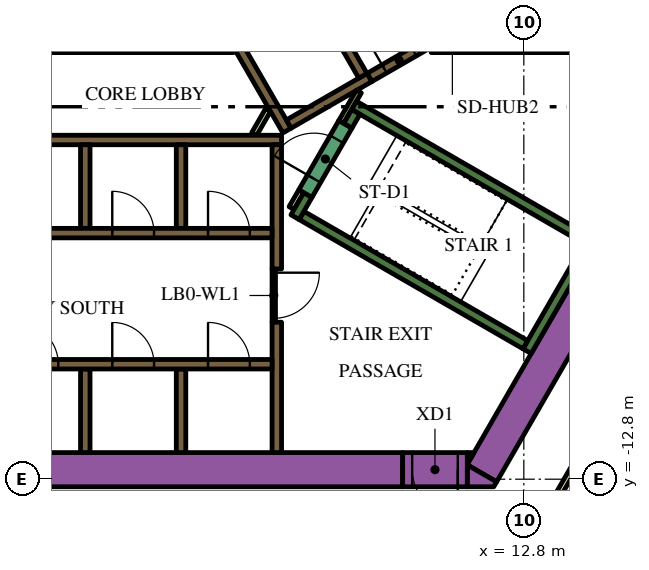
"""IFC4 building model, lengths in metres.
Left out: names, types, materials, properties, quantities, classifications, styles, units other than length and angle.
Written with IfcOpenShell. Run it as: python <this file> out.ifc"""

import sys

from ifc_helpers import new_model, si_unit, direction, frame, frame_2d, origin, place, context, subcontext, project, spatial, polyline, rectangle, outline, extrude, element, fill, save


model = new_model("IFC4")
c1 = context("Model", 3, precision=1e-05, world=origin(), true_north=direction((0.0, 1.0)))
c2 = subcontext(c1, "Body", "Model", "MODEL_VIEW")
j1 = project(units=[si_unit("LENGTHUNIT", "METRE"), si_unit("PLANEANGLEUNIT", "RADIAN")], contexts=[c1])
p1 = place(None, origin())
s1 = spatial("IfcSite", under=j1, at=p1, CompositionType="ELEMENT")
p2 = place(p1, origin())
s2 = spatial("IfcBuilding", under=s1, at=p2, CompositionType="ELEMENT")
p3 = place(p2, frame((0.0, 0.0, 91.5)))
s3 = spatial("IfcBuildingStorey", under=s2, at=p3, CompositionType="ELEMENT", Elevation=91.5)
p4 = place(p3, frame((6.776, 13.364, 0.0), z_axis=(0.0, 0.0, 1.0), x_axis=(0.500004177138, -0.8660229921, 0.0)))
e1 = element("IfcWall", 1, at=p4, inside=s3, PredefinedType="SOLIDWALL", context=c2, shape_type="SweptSolid", body=[
    extrude(rectangle(XDim=20.204, YDim=0.9, at=frame_2d((10.102, 0.0))), origin(), (0.0, 0.0, 1.0), 3.9),
])
p5 = place(p3, frame((11.695, -12.644, 0.0), z_axis=(0.0, 0.0, 1.0), x_axis=(0.500010229568, 0.86601949766, 0.0)))
e2 = element("IfcWall", 2, at=p5, inside=s3, PredefinedType="SOLIDWALL", context=c2, shape_type="SweptSolid", body=[
    extrude(rectangle(XDim=9.326, YDim=0.9, at=frame_2d((4.663, 0.0))), origin(), (0.0, 0.0, 1.0), 3.9),
])
p6 = place(p3, origin())
e3 = element("IfcWall", 3, at=p6, inside=s3, PredefinedType="SOLIDWALL", context=c2, shape_type="SweptSolid", body=[
    extrude(outline(polyline([(12.009, -13.0), (11.312, -13.0), (11.312, -12.425), (12.083, -12.871), (12.009, -13.0)])), origin(), (0.0, 0.0, 1.0), 3.9),
])
e4 = element("IfcWall", 4, at=p6, inside=s3, PredefinedType="SOLIDWALL", context=c2, shape_type="SweptSolid", body=[
    extrude(outline(polyline([(11.489, -12.1), (11.312, -12.407), (11.312, -12.1), (11.489, -12.1)])), origin(), (0.0, 0.0, 1.0), 3.9),
])
p7 = place(p3, frame((-12.019, -12.55, 0.0), z_axis=(0.0, 0.0, 1.0), x_axis=(1.0, 0.0, 0.0)))
e5 = element("IfcWall", 5, at=p7, inside=s3, PredefinedType="SOLIDWALL", context=c2, shape_type="SweptSolid", body=[
    extrude(rectangle(XDim=21.63, YDim=0.9, at=frame_2d((10.815, 0.0))), origin(), (0.0, 0.0, 1.0), 3.9),
])
p8 = place(p3, frame((12.885, -9.431, 0.0), z_axis=(0.0, 0.0, 1.0), x_axis=(0.500020560727, 0.866013532718, 0.0)))
e6 = element("IfcWall", 6, at=p8, inside=s3, PredefinedType="SOLIDWALL", context=c2, shape_type="SweptSolid", body=[
    extrude(rectangle(XDim=3.45, YDim=0.25, at=frame_2d((1.725, 0.0))), origin(), (0.0, 0.0, 1.0), 3.9),
])
p9 = place(p3, frame((12.84, -9.261, 0.0), z_axis=(0.0, 0.0, 1.0), x_axis=(-0.866013990052, 0.500019768644, 0.0)))
e7 = element("IfcWall", 7, at=p9, inside=s3, PredefinedType="SOLIDWALL", context=c2, shape_type="SweptSolid", body=[
    extrude(rectangle(XDim=6.8, YDim=0.25, at=frame_2d((3.4, 0.0))), origin(), (0.0, 0.0, 1.0), 3.9),
])
p10 = place(p3, frame((6.78, -5.906, 0.0), z_axis=(0.0, 0.0, 1.0), x_axis=(0.500223362819, 0.865896406789, 0.0)))
e8 = element("IfcWall", 8, at=p10, inside=s3, PredefinedType="SOLIDWALL", context=c2, shape_type="SweptSolid", body=[
    extrude(rectangle(XDim=0.675, YDim=0.25, at=frame_2d((0.337, 0.0))), origin(), (0.0, 0.0, 1.0), 3.9),
])
p11 = place(p3, frame((8.334, -2.964, 0.0), z_axis=(0.0, 0.0, 1.0), x_axis=(0.866016039709, -0.500016218704, 0.0)))
e9 = element("IfcWall", 9, at=p11, inside=s3, PredefinedType="SOLIDWALL", context=c2, shape_type="SweptSolid", body=[
    extrude(rectangle(XDim=7.05, YDim=0.25, at=frame_2d((3.525, 0.0))), origin(), (0.0, 0.0, 1.0), 3.9),
])
p12 = place(p3, frame((8.168, -3.503, 0.0), z_axis=(0.0, 0.0, 1.0), x_axis=(0.49972245349, 0.866185586049, 0.0)))
e10 = element("IfcWall", 10, at=p12, inside=s3, PredefinedType="SOLIDWALL", context=c2, shape_type="SweptSolid", body=[
    extrude(rectangle(XDim=0.425, YDim=0.25, at=frame_2d((0.212, 0.0))), origin(), (0.0, 0.0, 1.0), 3.9),
])
p13 = place(p3, frame((-5.545, -3.875, 0.0), z_axis=(0.0, 0.0, 1.0), x_axis=(1.0, 0.0, 0.0)))
e11 = element("IfcWall", 11, at=p13, inside=s3, PredefinedType="SOLIDWALL", context=c2, shape_type="SweptSolid", body=[
    extrude(rectangle(XDim=11.97, YDim=0.25, at=frame_2d((5.985, 0.0))), origin(), (0.0, 0.0, 1.0), 3.9),
])
p14 = place(p3, frame((6.3, -8.67, 0.0), z_axis=(0.0, 0.0, 1.0), x_axis=(0.0, -1.0, 0.0)))
e12 = element("IfcWall", 12, at=p14, inside=s3, PredefinedType="SOLIDWALL", context=c2, shape_type="SweptSolid", body=[
    extrude(rectangle(XDim=3.43, YDim=0.25, at=frame_2d((1.715, 0.0))), origin(), (0.0, 0.0, 1.0), 3.9),
])
p15 = place(p3, frame((6.3, -7.268, 0.0), z_axis=(0.0, 0.0, 1.0), x_axis=(0.0, 1.0, 0.0)))
e13 = element("IfcWall", 13, at=p15, inside=s3, PredefinedType="SOLIDWALL", context=c2, shape_type="SweptSolid", body=[
    extrude(rectangle(XDim=3.268, YDim=0.25, at=frame_2d((1.634, 0.0))), origin(), (0.0, 0.0, 1.0), 3.9),
])
for number, where, z_axis, x_axis in (
    (14, (3.78, -4.0, 0.0), (0.0, 0.0, 1.0), (0.0, -1.0, 0.0)),
    (15, (1.26, -4.0, 0.0), (0.0, 0.0, 1.0), (0.0, -1.0, 0.0)),
    (16, (3.78, -12.1, 0.0), (0.0, 0.0, 1.0), (0.0, 1.0, 0.0)),
    (17, (1.26, -12.1, 0.0), (0.0, 0.0, 1.0), (0.0, 1.0, 0.0)),
):
    element("IfcWall", number, at=place(p3, frame(where, z_axis=z_axis, x_axis=x_axis)), inside=s3, PredefinedType="SOLIDWALL", context=c2, shape_type="SweptSolid", body=[
        extrude(rectangle(XDim=2.2, YDim=0.25, at=frame_2d((1.1, 0.0))), origin(), (0.0, 0.0, 1.0), 3.9),
    ])
e18 = element("IfcWall", 18, at=p6, inside=s3, PredefinedType="SOLIDWALL", context=c2, shape_type="SweptSolid", body=[
    extrude(outline(polyline([(0.566, 6.725), (0.566, 6.875), (0.566, 6.875), (0.565, 6.875), (0.361, 6.875), (0.035, 7.439), (0.252, 7.564), (0.377, 7.348), (6.552, -3.348), (6.677, -3.564), (6.46, -3.689), (0.448, 6.725), (0.565, 6.725), (0.566, 6.725), (0.566, 6.725)])), origin(), (0.0, 0.0, 1.0), 3.9),
])
p16 = place(p3, frame((6.614, -3.456, 0.0), z_axis=(0.0, 0.0, 1.0), x_axis=(0.866031582473, 0.499989298045, 0.0)))
e19 = element("IfcWall", 19, at=p16, inside=s3, PredefinedType="SOLIDWALL", context=c2, shape_type="SweptSolid", body=[
    extrude(rectangle(XDim=2.455, YDim=0.25, at=frame_2d((1.228, 0.0))), origin(), (0.0, 0.0, 1.0), 3.9),
])
p17 = place(p3, frame((6.945, -5.222, 0.0), z_axis=(0.0, 0.0, 1.0), x_axis=(-0.499818422106, -0.866130212453, 0.0)))
e20 = element("IfcWall", 20, at=p17, inside=s3, PredefinedType="PARTITIONING", context=c2, shape_type="SweptSolid", body=[
    extrude(rectangle(XDim=0.514, YDim=0.15, at=frame_2d((0.257, 0.0))), origin(), (0.0, 0.0, 1.0), 2.75),
])
p18 = place(p3, frame((5.705, -3.718, 0.0), z_axis=(0.0, 0.0, 1.0), x_axis=(0.499962090823, 0.866047289552, 0.0)))
e21 = element("IfcWall", 21, at=p18, inside=s3, PredefinedType="PARTITIONING", context=c2, shape_type="SweptSolid", body=[
    extrude(rectangle(XDim=0.735, YDim=0.15, at=frame_2d((0.367, 0.0))), origin(), (0.0, 0.0, 1.0), 2.75),
])
p19 = place(p3, frame((8.459, -2.599, 0.0), z_axis=(0.0, 0.0, 1.0), x_axis=(-0.500041054325, -0.866001699761, 0.0)))
e22 = element("IfcWall", 22, at=p19, inside=s3, PredefinedType="PARTITIONING", context=c2, shape_type="SweptSolid", body=[
    extrude(rectangle(XDim=0.929, YDim=0.15, at=frame_2d((0.464, 0.0))), origin(), (0.0, 0.0, 1.0), 3.9),
])
p20 = place(p3, frame((-6.175, -9.775, 0.0), z_axis=(0.0, 0.0, 1.0), x_axis=(1.0, 0.0, 0.0)))
e23 = element("IfcWall", 23, at=p20, inside=s3, PredefinedType="SOLIDWALL", context=c2, shape_type="SweptSolid", body=[
    extrude(rectangle(XDim=12.35, YDim=0.25, at=frame_2d((6.175, 0.0))), origin(), (0.0, 0.0, 1.0), 3.9),
])
p21 = place(p20, frame((0.585, 0.0, 0.0)))
e24 = element("IfcOpeningElement", 24, at=p21, cuts=e23, PredefinedType="OPENING", context=c2, shape_type="SweptSolid", body=[
    extrude(rectangle(XDim=1.1, YDim=2.1, at=frame_2d((0.55, 1.05))), frame((0.0, 0.135, 0.0), z_axis=(0.0, -1.0, 0.0), x_axis=(1.0, 0.0, 0.0)), (0.0, 0.0, 1.0), 0.27),
])
p22 = place(p20, frame((3.105, 0.0, 0.0)))
e25 = element("IfcOpeningElement", 25, at=p22, cuts=e23, PredefinedType="OPENING", context=c2, shape_type="SweptSolid", body=[
    extrude(rectangle(XDim=1.1, YDim=2.1, at=frame_2d((0.55, 1.05))), frame((0.0, 0.135, 0.0), z_axis=(0.0, -1.0, 0.0), x_axis=(1.0, 0.0, 0.0)), (0.0, 0.0, 1.0), 0.27),
])
p23 = place(p20, frame((5.625, 0.0, 0.0)))
e26 = element("IfcOpeningElement", 26, at=p23, cuts=e23, PredefinedType="OPENING", context=c2, shape_type="SweptSolid", body=[
    extrude(rectangle(XDim=1.1, YDim=2.1, at=frame_2d((0.55, 1.05))), frame((0.0, 0.135, 0.0), z_axis=(0.0, -1.0, 0.0), x_axis=(1.0, 0.0, 0.0)), (0.0, 0.0, 1.0), 0.27),
])
p24 = place(p20, frame((8.145, 0.0, 0.0)))
e27 = element("IfcOpeningElement", 27, at=p24, cuts=e23, PredefinedType="OPENING", context=c2, shape_type="SweptSolid", body=[
    extrude(rectangle(XDim=1.1, YDim=2.1, at=frame_2d((0.55, 1.05))), frame((0.0, 0.135, 0.0), z_axis=(0.0, -1.0, 0.0), x_axis=(1.0, 0.0, 0.0)), (0.0, 0.0, 1.0), 0.27),
])
p25 = place(p20, frame((10.665, 0.0, 0.0)))
e28 = element("IfcOpeningElement", 28, at=p25, cuts=e23, PredefinedType="OPENING", context=c2, shape_type="SweptSolid", body=[
    extrude(rectangle(XDim=1.1, YDim=2.1, at=frame_2d((0.55, 1.05))), frame((0.0, 0.135, 0.0), z_axis=(0.0, -1.0, 0.0), x_axis=(1.0, 0.0, 0.0)), (0.0, 0.0, 1.0), 0.27),
])
p26 = place(p3, frame((-6.175, -6.325, 0.0), z_axis=(0.0, 0.0, 1.0), x_axis=(1.0, 0.0, 0.0)))
e29 = element("IfcWall", 29, at=p26, inside=s3, PredefinedType="SOLIDWALL", context=c2, shape_type="SweptSolid", body=[
    extrude(rectangle(XDim=12.35, YDim=0.25, at=frame_2d((6.175, 0.0))), origin(), (0.0, 0.0, 1.0), 3.9),
])
p27 = place(p26, frame((3.205, 0.0, 0.0)))
e30 = element("IfcOpeningElement", 30, at=p27, cuts=e29, PredefinedType="OPENING", context=c2, shape_type="SweptSolid", body=[
    extrude(rectangle(XDim=0.9, YDim=2.1, at=frame_2d((0.45, 1.05))), frame((0.0, 0.135, 0.0), z_axis=(0.0, -1.0, 0.0), x_axis=(1.0, 0.0, 0.0)), (0.0, 0.0, 1.0), 0.27),
])
p28 = place(p26, frame((8.145, 0.0, 0.0)))
e31 = element("IfcOpeningElement", 31, at=p28, cuts=e29, PredefinedType="OPENING", context=c2, shape_type="SweptSolid", body=[
    extrude(rectangle(XDim=1.1, YDim=2.1, at=frame_2d((0.55, 1.05))), frame((0.0, 0.135, 0.0), z_axis=(0.0, -1.0, 0.0), x_axis=(1.0, 0.0, 0.0)), (0.0, 0.0, 1.0), 0.27),
])
p29 = place(p26, frame((10.665, 0.0, 0.0)))
e32 = element("IfcOpeningElement", 32, at=p29, cuts=e29, PredefinedType="OPENING", context=c2, shape_type="SweptSolid", body=[
    extrude(rectangle(XDim=1.1, YDim=2.1, at=frame_2d((0.55, 1.05))), frame((0.0, 0.135, 0.0), z_axis=(0.0, -1.0, 0.0), x_axis=(1.0, 0.0, 0.0)), (0.0, 0.0, 1.0), 0.27),
])
p30 = place(p3, frame((8.565, -2.185, 0.0), z_axis=(0.0, 0.0, 1.0), x_axis=(-0.499997954832, 0.866026584559, 0.0)))
e33 = element("IfcWall", 33, at=p30, inside=s3, PredefinedType="SOLIDWALL", context=c2, shape_type="SweptSolid", body=[
    extrude(rectangle(XDim=12.35, YDim=0.25, at=frame_2d((6.175, 0.0))), origin(), (0.0, 0.0, 1.0), 3.9),
])
p31 = place(p30, frame((5.725, 0.0, 0.0)))
e34 = element("IfcOpeningElement", 34, at=p31, cuts=e33, PredefinedType="OPENING", context=c2, shape_type="SweptSolid", body=[
    extrude(rectangle(XDim=0.9, YDim=2.1, at=frame_2d((0.45, 1.05))), frame((0.0, 0.135, 0.0), z_axis=(0.0, -1.0, 0.0), x_axis=(1.0, 0.0, 0.0)), (0.0, 0.0, 1.0), 0.27),
])
p32 = place(p3, frame((7.053, -5.284, 0.0), z_axis=(0.0, 0.0, 1.0), x_axis=(0.500078061341, 0.865980330357, 0.0)))
e35 = element("IfcWall", 35, at=p32, inside=s3, PredefinedType="SOLIDWALL", context=c2, shape_type="SweptSolid", body=[
    extrude(rectangle(XDim=2.1, YDim=0.4, at=frame_2d((1.05, 0.0))), origin(), (0.0, 0.0, 1.0), 3.9),
])
p33 = place(p32, frame((0.45, 0.0, 0.0)))
e36 = element("IfcOpeningElement", 36, at=p33, cuts=e35, PredefinedType="OPENING", context=c2, shape_type="SweptSolid", body=[
    extrude(rectangle(XDim=1.2, YDim=2.1, at=frame_2d((0.6, 1.05))), frame((0.0, 0.21, 0.0), z_axis=(0.0, -1.0, 0.0), x_axis=(1.0, 0.0, 0.0)), (0.0, 0.0, 1.0), 0.42),
])
p34 = place(p3, frame((8.74, -2.229, 0.0), z_axis=(0.0, 0.0, 1.0), x_axis=(0.865989075817, 0.500062916607, 0.0)))
e37 = element("IfcWall", 37, at=p34, inside=s3, PredefinedType="SOLIDWALL", context=c2, shape_type="SweptSolid", body=[
    extrude(rectangle(XDim=1.8, YDim=0.25, at=frame_2d((0.9, 0.0))), origin(), (0.0, 0.0, 1.0), 3.9),
])
p35 = place(p34, frame((0.45, 0.0, 0.0)))
e38 = element("IfcOpeningElement", 38, at=p35, cuts=e37, PredefinedType="OPENING", context=c2, shape_type="SweptSolid", body=[
    extrude(rectangle(XDim=0.9, YDim=2.1, at=frame_2d((0.45, 1.05))), frame((0.0, 0.135, 0.0), z_axis=(0.0, -1.0, 0.0), x_axis=(1.0, 0.0, 0.0)), (0.0, 0.0, 1.0), 0.27),
])
p36 = place(p3, frame((6.22, -7.266, 0.0), z_axis=(0.0, 0.0, 1.0), x_axis=(0.0, -1.0, 0.0)))
e39 = element("IfcWall", 39, at=p36, inside=s3, PredefinedType="PARTITIONING", context=c2, shape_type="SweptSolid", body=[
    extrude(rectangle(XDim=1.4, YDim=0.09, at=frame_2d((0.7, 0.0))), origin(), (0.0, 0.0, 1.0), 2.75),
])
p37 = place(p36, frame((0.1, 0.0, 0.0)))
e40 = element("IfcOpeningElement", 40, at=p37, cuts=e39, PredefinedType="OPENING", context=c2, shape_type="SweptSolid", body=[
    extrude(rectangle(XDim=1.2, YDim=2.1, at=frame_2d((0.6, 1.05))), frame((0.0, 0.055, 0.0), z_axis=(0.0, -1.0, 0.0), x_axis=(1.0, 0.0, 0.0)), (0.0, 0.0, 1.0), 0.11),
])
p38 = place(p3, frame((11.312, -12.55, 0.0), z_axis=(0.0, 0.0, 1.0), x_axis=(-1.0, 0.0, 0.0)))
e41 = element("IfcWall", 41, at=p38, inside=s3, PredefinedType="SOLIDWALL", context=c2, shape_type="SweptSolid", body=[
    extrude(rectangle(XDim=1.7, YDim=0.9, at=frame_2d((0.85, 0.0))), origin(), (0.0, 0.0, 1.0), 3.9),
])
p39 = place(p38, frame((0.25, 0.0, 0.0)))
e42 = element("IfcOpeningElement", 42, at=p39, cuts=e41, PredefinedType="OPENING", context=c2, shape_type="SweptSolid", body=[
    extrude(rectangle(XDim=1.2, YDim=2.1, at=frame_2d((0.6, 1.05))), frame((0.0, 0.46, 0.0), z_axis=(0.0, -1.0, 0.0), x_axis=(1.0, 0.0, 0.0)), (0.0, 0.0, 1.0), 0.92),
])
p40 = place(p3, frame((6.163, 18.475, 0.0), z_axis=(0.0, 0.0, 1.0), x_axis=(0.500001317485, -0.866024643133, 0.0)))
e43 = element("IfcWall", 43, at=p40, inside=s3, PredefinedType="PARTITIONING", context=c2, shape_type="SweptSolid", body=[
    extrude(rectangle(XDim=25.767, YDim=0.15, at=frame_2d((12.883, 0.0))), origin(), (0.0, 0.0, 1.0), 2.75),
])
p41 = place(p40, frame((24.241, 0.0, 0.0)))
e44 = element("IfcOpeningElement", 44, at=p41, cuts=e43, PredefinedType="OPENING", context=c2, shape_type="SweptSolid", body=[
    extrude(rectangle(XDim=1.0, YDim=2.1, at=frame_2d((0.5, 1.05))), frame((0.0, 0.085, 0.0), z_axis=(0.0, -1.0, 0.0), x_axis=(1.0, 0.0, 0.0)), (0.0, 0.0, 1.0), 0.17),
])
p42 = place(p40, frame((13.144, 0.0, 0.0)))
e45 = element("IfcOpeningElement", 45, at=p42, cuts=e43, PredefinedType="OPENING", context=c2, shape_type="SweptSolid", body=[
    extrude(rectangle(XDim=1.0, YDim=2.1, at=frame_2d((0.5, 1.05))), frame((0.0, 0.085, 0.0), z_axis=(0.0, -1.0, 0.0), x_axis=(1.0, 0.0, 0.0)), (0.0, 0.0, 1.0), 0.17),
])
p43 = place(p40, frame((10.874, 0.0, 0.0)))
e46 = element("IfcOpeningElement", 46, at=p43, cuts=e43, PredefinedType="OPENING", context=c2, shape_type="SweptSolid", body=[
    extrude(rectangle(XDim=0.9, YDim=2.1, at=frame_2d((0.45, 1.05))), frame((0.0, 0.085, 0.0), z_axis=(0.0, -1.0, 0.0), x_axis=(1.0, 0.0, 0.0)), (0.0, 0.0, 1.0), 0.17),
])
p44 = place(p40, frame((3.718, 0.0, 0.0)))
e47 = element("IfcOpeningElement", 47, at=p44, cuts=e43, PredefinedType="OPENING", context=c2, shape_type="SweptSolid", body=[
    extrude(rectangle(XDim=1.1, YDim=2.1, at=frame_2d((0.55, 1.05))), frame((0.0, 0.085, 0.0), z_axis=(0.0, -1.0, 0.0), x_axis=(1.0, 0.0, 0.0)), (0.0, 0.0, 1.0), 0.17),
])
p45 = place(p40, frame((2.411, 0.0, 0.0)))
e48 = element("IfcOpeningElement", 48, at=p45, cuts=e43, PredefinedType="OPENING", context=c2, shape_type="SweptSolid", body=[
    extrude(rectangle(XDim=1.0, YDim=2.1, at=frame_2d((0.5, 1.05))), frame((0.0, 0.085, 0.0), z_axis=(0.0, -1.0, 0.0), x_axis=(1.0, 0.0, 0.0)), (0.0, 0.0, 1.0), 0.17),
])
p46 = place(p3, frame((15.587, -9.952, 0.0), z_axis=(0.0, 0.0, 1.0), x_axis=(-0.500016618951, -0.866015808616, 0.0)))
e49 = element("IfcWall", 49, at=p46, inside=s3, PredefinedType="PARTITIONING", context=c2, shape_type="SweptSolid", body=[
    extrude(rectangle(XDim=5.268, YDim=0.15, at=frame_2d((2.634, 0.0))), origin(), (0.0, 0.0, 1.0), 2.75),
])
p47 = place(p23, origin())
e50 = element("IfcDoor", 50, at=p47, inside=s3, OperationType="DOUBLE_DOOR_SLIDING", PredefinedType="DOOR", context=c2, shape_type="SweptSolid", body=[
    extrude(rectangle(XDim=1.1, YDim=2.1, at=frame_2d((0.55, 1.05))), frame((0.0, 0.025, 0.0), z_axis=(0.0, -1.0, 0.0), x_axis=(1.0, 0.0, 0.0)), (0.0, 0.0, 1.0), 0.05),
])
fill(e26, e50)
p48 = place(p24, origin())
e51 = element("IfcDoor", 51, at=p48, inside=s3, OperationType="DOUBLE_DOOR_SLIDING", PredefinedType="DOOR", context=c2, shape_type="SweptSolid", body=[
    extrude(rectangle(XDim=1.1, YDim=2.1, at=frame_2d((0.55, 1.05))), frame((0.0, 0.025, 0.0), z_axis=(0.0, -1.0, 0.0), x_axis=(1.0, 0.0, 0.0)), (0.0, 0.0, 1.0), 0.05),
])
fill(e27, e51)
p49 = place(p25, origin())
e52 = element("IfcDoor", 52, at=p49, inside=s3, OperationType="DOUBLE_DOOR_SLIDING", PredefinedType="DOOR", context=c2, shape_type="SweptSolid", body=[
    extrude(rectangle(XDim=1.1, YDim=2.1, at=frame_2d((0.55, 1.05))), frame((0.0, 0.025, 0.0), z_axis=(0.0, -1.0, 0.0), x_axis=(1.0, 0.0, 0.0)), (0.0, 0.0, 1.0), 0.05),
])
fill(e28, e52)
p50 = place(p28, origin())
e53 = element("IfcDoor", 53, at=p50, inside=s3, OperationType="DOUBLE_DOOR_SLIDING", PredefinedType="DOOR", context=c2, shape_type="SweptSolid", body=[
    extrude(rectangle(XDim=1.1, YDim=2.1, at=frame_2d((0.55, 1.05))), frame((0.0, 0.025, 0.0), z_axis=(0.0, -1.0, 0.0), x_axis=(1.0, 0.0, 0.0)), (0.0, 0.0, 1.0), 0.05),
])
fill(e31, e53)
p51 = place(p29, origin())
e54 = element("IfcDoor", 54, at=p51, inside=s3, OperationType="DOUBLE_DOOR_SLIDING", PredefinedType="DOOR", context=c2, shape_type="SweptSolid", body=[
    extrude(rectangle(XDim=1.1, YDim=2.1, at=frame_2d((0.55, 1.05))), frame((0.0, 0.025, 0.0), z_axis=(0.0, -1.0, 0.0), x_axis=(1.0, 0.0, 0.0)), (0.0, 0.0, 1.0), 0.05),
])
fill(e32, e54)
p52 = place(p33, origin())
e55 = element("IfcDoor", 55, at=p52, inside=s3, OperationType="SINGLE_SWING_LEFT", PredefinedType="DOOR", context=c2, shape_type="SweptSolid", body=[
    extrude(rectangle(XDim=1.2, YDim=2.1, at=frame_2d((0.6, 1.05))), frame((0.0, 0.025, 0.0), z_axis=(0.0, -1.0, 0.0), x_axis=(1.0, 0.0, 0.0)), (0.0, 0.0, 1.0), 0.05),
])
fill(e36, e55)
p53 = place(p35, origin())
e56 = element("IfcDoor", 56, at=p53, inside=s3, OperationType="SINGLE_SWING_LEFT", PredefinedType="DOOR", context=c2, shape_type="SweptSolid", body=[
    extrude(rectangle(XDim=0.9, YDim=2.1, at=frame_2d((0.45, 1.05))), frame((0.0, 0.025, 0.0), z_axis=(0.0, -1.0, 0.0), x_axis=(1.0, 0.0, 0.0)), (0.0, 0.0, 1.0), 0.05),
])
fill(e38, e56)
p54 = place(p37, origin())
e57 = element("IfcDoor", 57, at=p54, inside=s3, OperationType="SINGLE_SWING_LEFT", PredefinedType="DOOR", context=c2, shape_type="SweptSolid", body=[
    extrude(rectangle(XDim=1.2, YDim=2.1, at=frame_2d((0.6, 1.05))), frame((0.0, 0.025, 0.0), z_axis=(0.0, -1.0, 0.0), x_axis=(1.0, 0.0, 0.0)), (0.0, 0.0, 1.0), 0.05),
])
fill(e40, e57)
p55 = place(p39, origin())
e58 = element("IfcDoor", 58, at=p55, inside=s3, OperationType="SINGLE_SWING_LEFT", PredefinedType="DOOR", context=c2, shape_type="SweptSolid", body=[
    extrude(rectangle(XDim=1.2, YDim=2.1, at=frame_2d((0.6, 1.05))), frame((0.0, 0.025, 0.0), z_axis=(0.0, -1.0, 0.0), x_axis=(1.0, 0.0, 0.0)), (0.0, 0.0, 1.0), 0.05),
])
fill(e42, e58)
save(model, sys.argv[1])
